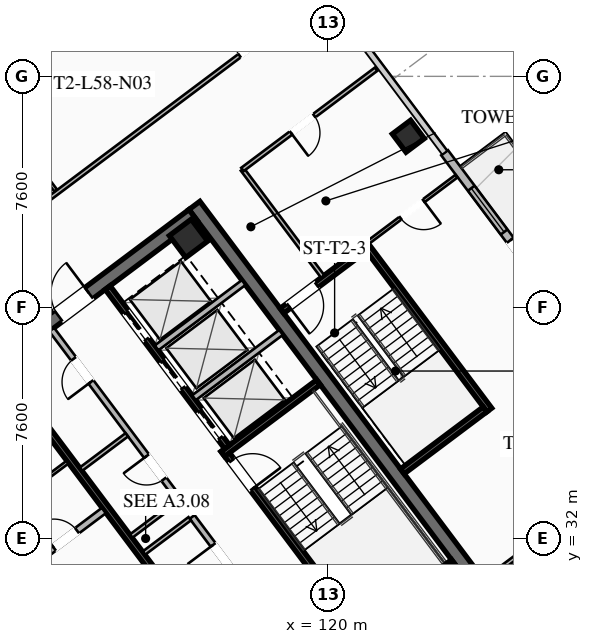
"""IFC4 building model, lengths in metres.
Left out: names, types, materials, properties, quantities, classifications, styles, units other than length and angle.
Written with IfcOpenShell. Run it as: python <this file> out.ifc"""

import sys

from ifc_helpers import new_model, si_unit, direction, frame, frame_2d, origin, origin_2d, place, context, subcontext, project, spatial, rectangle, hollow_rectangle, extrude, element, fill, save


model = new_model("IFC4")
c1 = context("Model", 3, precision=1e-05, world=origin(), true_north=direction((0.0, 1.0)))
c2 = subcontext(c1, "Body", "Model", "MODEL_VIEW")
j1 = project(units=[si_unit("LENGTHUNIT", "METRE"), si_unit("PLANEANGLEUNIT", "RADIAN")], contexts=[c1])
p1 = place(None, origin())
s1 = spatial("IfcSite", under=j1, at=p1, CompositionType="ELEMENT")
p2 = place(p1, origin())
s2 = spatial("IfcBuilding", under=s1, at=p2, CompositionType="ELEMENT")
p3 = place(p2, frame((0.0, 0.0, 214.85)))
s3 = spatial("IfcBuildingStorey", under=s2, at=p3, CompositionType="ELEMENT", Elevation=214.85)
for number, where, z_axis, x_axis in (
    (1, (112.396, 21.047, 0.0), (0.0, 0.0, 1.0), (-0.6, 0.8, 0.0)),
    (2, (115.604, 42.953, 0.0), (0.0, 0.0, 1.0), (0.6, -0.8, 0.0)),
):
    element("IfcWall", number, at=place(p3, frame(where, z_axis=z_axis, x_axis=x_axis)), inside=s3, PredefinedType="SHEAR", context=c2, shape_type="SweptSolid", body=[
        extrude(rectangle(XDim=15.6, YDim=0.45, at=frame_2d((7.8, 0.0))), origin(), (0.0, 0.0, 1.0), 3.55),
    ])
p4 = place(p3, frame((103.351, 33.482, 0.0), z_axis=(0.0, 0.0, 1.0), x_axis=(0.8, 0.6, 0.0)))
e3 = element("IfcWall", 3, at=p4, inside=s3, PredefinedType="SHEAR", context=c2, shape_type="SweptSolid", body=[
    extrude(rectangle(XDim=15.26, YDim=0.45, at=frame_2d((7.63, 0.0))), origin(), (0.0, 0.0, 1.0), 3.55),
])
p5 = place(p4, frame((4.68, 0.0, 0.0)))
e4 = element("IfcOpeningElement", 4, at=p5, cuts=e3, PredefinedType="OPENING", context=c2, shape_type="SweptSolid", body=[
    extrude(rectangle(XDim=1.25, YDim=2.25, at=frame_2d((0.625, 1.125))), frame((0.0, 0.235, 0.0), z_axis=(0.0, -1.0, 0.0), x_axis=(1.0, 0.0, 0.0)), (0.0, 0.0, 1.0), 0.47),
])
p6 = place(p4, frame((9.73, 0.0, 0.0)))
e5 = element("IfcOpeningElement", 5, at=p6, cuts=e3, PredefinedType="OPENING", context=c2, shape_type="SweptSolid", body=[
    extrude(rectangle(XDim=1.25, YDim=2.25, at=frame_2d((0.625, 1.125))), frame((0.0, 0.235, 0.0), z_axis=(0.0, -1.0, 0.0), x_axis=(1.0, 0.0, 0.0)), (0.0, 0.0, 1.0), 0.47),
])
for number, where, z_axis, x_axis in (
    (6, (123.87, 30.59, 0.0), (0.0, 0.0, 1.0), (0.8, 0.6, 0.0)),
    (7, (115.41, 41.87, 0.0), (0.0, 0.0, 1.0), (0.8, 0.6, 0.0)),
):
    element("IfcColumn", number, at=place(p3, frame(where, z_axis=z_axis, x_axis=x_axis)), inside=s3, PredefinedType="COLUMN", context=c2, shape_type="SweptSolid", body=[
        extrude(hollow_rectangle(XDim=0.9, YDim=0.9, WallThickness=0.04, at=origin_2d()), origin(), (0.0, 0.0, 1.0), 3.37),
    ])
p7 = place(p3, frame((122.64, 45.23, 0.0), z_axis=(0.0, 0.0, 1.0), x_axis=(0.799999996291, 0.600000004945, 0.0)))
e8 = element("IfcColumn", 8, at=p7, inside=s3, PredefinedType="COLUMN", context=c2, shape_type="SweptSolid", body=[
    extrude(hollow_rectangle(XDim=0.75, YDim=0.75, WallThickness=0.032, at=origin_2d()), origin(), (0.0, 0.0, 1.0), 3.37),
])
p8 = place(p3, frame((123.834, 44.688, 0.0), z_axis=(0.0, 0.0, 1.0), x_axis=(0.600004595526, -0.799996553335, 0.0)))
e9 = element("IfcWall", 9, at=p8, inside=s3, PredefinedType="SOLIDWALL", context=c2, shape_type="SweptSolid", body=[
    extrude(rectangle(XDim=8.5, YDim=0.28, at=frame_2d((4.25, 0.0))), origin(), (0.0, 0.0, 1.0), 3.37),
])
p9 = place(p8, frame((3.6, 0.0, 0.0)))
e10 = element("IfcOpeningElement", 10, at=p9, cuts=e9, PredefinedType="OPENING", context=c2, shape_type="SweptSolid", body=[
    extrude(rectangle(XDim=1.3, YDim=2.15, at=frame_2d((0.65, 1.075))), frame((0.0, 0.15, 0.0), z_axis=(0.0, -1.0, 0.0), x_axis=(1.0, 0.0, 0.0)), (0.0, 0.0, 1.0), 0.3),
])
p10 = place(p8, frame((1.46, 0.0, 0.85)))
e11 = element("IfcOpeningElement", 11, at=p10, cuts=e9, PredefinedType="OPENING", context=c2, shape_type="SweptSolid", body=[
    extrude(rectangle(XDim=1.8, YDim=1.92, at=frame_2d((0.9, 0.96))), frame((0.0, 0.15, 0.0), z_axis=(0.0, -1.0, 0.0), x_axis=(1.0, 0.0, 0.0)), (0.0, 0.0, 1.0), 0.3),
])
p11 = place(p3, frame((111.44, 29.08, 0.0), z_axis=(0.0, 0.0, 1.0), x_axis=(-0.59999041401, 0.800007189403, 0.0)))
e12 = element("IfcWall", 12, at=p11, inside=s3, PredefinedType="SHEAR", context=c2, shape_type="SweptSolid", body=[
    extrude(rectangle(XDim=8.15, YDim=0.2, at=frame_2d((4.075, 0.0))), origin(), (0.0, 0.0, 1.0), 3.37),
])
p12 = place(p11, frame((0.45, 0.0, 0.0)))
e13 = element("IfcOpeningElement", 13, at=p12, cuts=e12, PredefinedType="OPENING", context=c2, shape_type="SweptSolid", body=[
    extrude(rectangle(XDim=1.15, YDim=2.2, at=frame_2d((0.575, 1.1))), frame((0.0, 0.11, 0.0), z_axis=(0.0, -1.0, 0.0), x_axis=(1.0, 0.0, 0.0)), (0.0, 0.0, 1.0), 0.22),
])
p13 = place(p3, frame((116.56, 34.92, 0.0), z_axis=(0.0, 0.0, 1.0), x_axis=(0.59999041401, -0.800007189403, 0.0)))
e14 = element("IfcWall", 14, at=p13, inside=s3, PredefinedType="SHEAR", context=c2, shape_type="SweptSolid", body=[
    extrude(rectangle(XDim=8.15, YDim=0.2, at=frame_2d((4.075, 0.0))), origin(), (0.0, 0.0, 1.0), 3.37),
])
p14 = place(p13, frame((0.45, 0.0, 0.0)))
e15 = element("IfcOpeningElement", 15, at=p14, cuts=e14, PredefinedType="OPENING", context=c2, shape_type="SweptSolid", body=[
    extrude(rectangle(XDim=1.15, YDim=2.2, at=frame_2d((0.575, 1.1))), frame((0.0, 0.11, 0.0), z_axis=(0.0, -1.0, 0.0), x_axis=(1.0, 0.0, 0.0)), (0.0, 0.0, 1.0), 0.22),
])
for number, where, z_axis, x_axis in (
    (16, (116.54, 34.78, 0.0), (0.0, 0.0, 1.0), (0.8, 0.6, 0.0)),
    (17, (120.98, 28.86, 0.0), (0.0, 0.0, 1.0), (0.8, 0.6, 0.0)),
):
    element("IfcWall", number, at=place(p3, frame(where, z_axis=z_axis, x_axis=x_axis)), inside=s3, PredefinedType="SHEAR", context=c2, shape_type="SweptSolid", body=[
        extrude(rectangle(XDim=3.93, YDim=0.2, at=frame_2d((1.965, 0.0))), origin(), (0.0, 0.0, 1.0), 3.37),
    ])
p15 = place(p3, frame((118.058, 25.856, 0.0), z_axis=(0.0, 0.0, 1.0), x_axis=(-0.600002657301, 0.799998007018, 0.0)))
e18 = element("IfcWall", 18, at=p15, inside=s3, PredefinedType="SHEAR", context=c2, shape_type="SweptSolid", body=[
    extrude(rectangle(XDim=14.7, YDim=0.2, at=frame_2d((7.35, 0.0))), origin(), (0.0, 0.0, 1.0), 3.37),
])
p16 = place(p3, frame((110.104, 31.028, 0.0), z_axis=(0.0, 0.0, 1.0), x_axis=(0.800018601094, 0.59997519774, 0.0)))
e19 = element("IfcWall", 19, at=p16, inside=s3, PredefinedType="SOLIDWALL", context=c2, shape_type="SweptSolid", body=[
    extrude(rectangle(XDim=3.15, YDim=0.22, at=frame_2d((1.575, 0.0))), origin(), (0.0, 0.0, 1.0), 2.723),
])
p17 = place(p16, frame((1.1, 0.0, 0.0)))
e20 = element("IfcOpeningElement", 20, at=p17, cuts=e19, PredefinedType="OPENING", context=c2, shape_type="SweptSolid", body=[
    extrude(rectangle(XDim=0.95, YDim=2.05, at=frame_2d((0.475, 1.025))), frame((0.0, 0.12, 0.0), z_axis=(0.0, -1.0, 0.0), x_axis=(1.0, 0.0, 0.0)), (0.0, 0.0, 1.0), 0.24),
])
p18 = place(p3, frame((112.75, 40.25, 0.0), z_axis=(0.0, 0.0, 1.0), x_axis=(0.599994036198, -0.800004472816, 0.0)))
e21 = element("IfcWall", 21, at=p18, inside=s3, PredefinedType="SHEAR", context=c2, shape_type="SweptSolid", body=[
    extrude(rectangle(XDim=6.55, YDim=0.2, at=frame_2d((3.275, 0.0))), origin(), (0.0, 0.0, 1.0), 3.37),
])
p19 = place(p18, frame((5.075, 0.0, 0.0)))
e22 = element("IfcOpeningElement", 22, at=p19, cuts=e21, PredefinedType="OPENING", context=c2, shape_type="SweptSolid", body=[
    extrude(rectangle(XDim=1.1, YDim=2.2, at=frame_2d((0.55, 1.1))), frame((0.0, 0.11, 0.0), z_axis=(0.0, -1.0, 0.0), x_axis=(1.0, 0.0, 0.0)), (0.0, 0.0, 1.0), 0.22),
])
p20 = place(p18, frame((3.025, 0.0, 0.0)))
e23 = element("IfcOpeningElement", 23, at=p20, cuts=e21, PredefinedType="OPENING", context=c2, shape_type="SweptSolid", body=[
    extrude(rectangle(XDim=1.1, YDim=2.2, at=frame_2d((0.55, 1.1))), frame((0.0, 0.11, 0.0), z_axis=(0.0, -1.0, 0.0), x_axis=(1.0, 0.0, 0.0)), (0.0, 0.0, 1.0), 0.22),
])
p21 = place(p18, frame((1.025, 0.0, 0.0)))
e24 = element("IfcOpeningElement", 24, at=p21, cuts=e21, PredefinedType="OPENING", context=c2, shape_type="SweptSolid", body=[
    extrude(rectangle(XDim=1.1, YDim=2.2, at=frame_2d((0.55, 1.1))), frame((0.0, 0.11, 0.0), z_axis=(0.0, -1.0, 0.0), x_axis=(1.0, 0.0, 0.0)), (0.0, 0.0, 1.0), 0.22),
])
for number, where, z_axis, x_axis in (
    (25, (115.59, 36.63, 0.0), (0.0, 0.0, 1.0), (0.8, 0.6, 0.0)),
    (26, (114.36, 38.27, 0.0), (0.0, 0.0, 1.0), (0.8, 0.6, 0.0)),
):
    element("IfcWall", number, at=place(p3, frame(where, z_axis=z_axis, x_axis=x_axis)), inside=s3, PredefinedType="SOLIDWALL", context=c2, shape_type="SweptSolid", body=[
        extrude(rectangle(XDim=3.58, YDim=0.2, at=frame_2d((1.79, 0.0))), origin(), (0.0, 0.0, 1.0), 3.37),
    ])
p22 = place(p3, frame((108.91, 32.62, 0.0), z_axis=(0.0, 0.0, 1.0), x_axis=(0.800018601094, 0.59997519774, 0.0)))
e27 = element("IfcWall", 27, at=p22, inside=s3, PredefinedType="PARTITIONING", context=c2, shape_type="SweptSolid", body=[
    extrude(rectangle(XDim=3.15, YDim=0.11, at=frame_2d((1.575, 0.0))), origin(), (0.0, 0.0, 1.0), 2.723),
])
p23 = place(p3, frame((119.73, 27.11, 0.0), z_axis=(0.0, 0.0, 1.0), x_axis=(-0.600005580459, 0.799995814625, 0.0)))
e28 = element("IfcWall", 28, at=p23, inside=s3, PredefinedType="SOLIDWALL", context=c2, shape_type="SweptSolid", body=[
    extrude(rectangle(XDim=7.0, YDim=0.2, at=frame_2d((3.5, 0.0))), origin(), (0.0, 0.0, 1.0), 2.723),
])
p24 = place(p23, frame((0.85, 0.0, 0.0)))
e29 = element("IfcOpeningElement", 29, at=p24, cuts=e28, PredefinedType="OPENING", context=c2, shape_type="SweptSolid", body=[
    extrude(rectangle(XDim=0.95, YDim=2.05, at=frame_2d((0.475, 1.025))), frame((0.0, 0.11, 0.0), z_axis=(0.0, -1.0, 0.0), x_axis=(1.0, 0.0, 0.0)), (0.0, 0.0, 1.0), 0.22),
])
p25 = place(p23, frame((4.8, 0.0, 0.0)))
e30 = element("IfcOpeningElement", 30, at=p25, cuts=e28, PredefinedType="OPENING", context=c2, shape_type="SweptSolid", body=[
    extrude(rectangle(XDim=1.05, YDim=2.2, at=frame_2d((0.525, 1.1))), frame((0.0, 0.11, 0.0), z_axis=(0.0, -1.0, 0.0), x_axis=(1.0, 0.0, 0.0)), (0.0, 0.0, 1.0), 0.22),
])
p26 = place(p3, frame((113.946, 31.522, 0.0), z_axis=(0.0, 0.0, 1.0), x_axis=(0.8, 0.6, 0.0)))
e31 = element("IfcWall", 31, at=p26, inside=s3, PredefinedType="PARTITIONING", context=c2, shape_type="SweptSolid", body=[
    extrude(rectangle(XDim=1.88, YDim=0.135, at=frame_2d((0.94, 0.0))), origin(), (0.0, 0.0, 1.0), 2.723),
])
p27 = place(p3, frame((115.11, 33.27, 0.0), z_axis=(0.0, 0.0, 1.0), x_axis=(-0.600011160345, 0.79999162962, 0.0)))
e32 = element("IfcWall", 32, at=p27, inside=s3, PredefinedType="SOLIDWALL", context=c2, shape_type="SweptSolid", body=[
    extrude(rectangle(XDim=7.0, YDim=0.2, at=frame_2d((3.5, 0.0))), origin(), (0.0, 0.0, 1.0), 2.723),
])
p28 = place(p27, frame((0.85, 0.0, 0.0)))
e33 = element("IfcOpeningElement", 33, at=p28, cuts=e32, PredefinedType="OPENING", context=c2, shape_type="SweptSolid", body=[
    extrude(rectangle(XDim=0.95, YDim=2.05, at=frame_2d((0.475, 1.025))), frame((0.0, 0.11, 0.0), z_axis=(0.0, -1.0, 0.0), x_axis=(1.0, 0.0, 0.0)), (0.0, 0.0, 1.0), 0.22),
])
p29 = place(p27, frame((4.85, 0.0, 0.0)))
e34 = element("IfcOpeningElement", 34, at=p29, cuts=e32, PredefinedType="OPENING", context=c2, shape_type="SweptSolid", body=[
    extrude(rectangle(XDim=0.95, YDim=2.05, at=frame_2d((0.475, 1.025))), frame((0.0, 0.11, 0.0), z_axis=(0.0, -1.0, 0.0), x_axis=(1.0, 0.0, 0.0)), (0.0, 0.0, 1.0), 0.22),
])
p30 = place(p3, frame((113.526, 32.082, 0.0), z_axis=(0.0, 0.0, 1.0), x_axis=(0.800046745961, 0.599937666993, 0.0)))
e35 = element("IfcWall", 35, at=p30, inside=s3, PredefinedType="PARTITIONING", context=c2, shape_type="SweptSolid", body=[
    extrude(rectangle(XDim=1.88, YDim=0.135, at=frame_2d((0.94, 0.0))), origin(), (0.0, 0.0, 1.0), 2.723),
])
p31 = place(p3, frame((111.876, 34.282, 0.0), z_axis=(0.0, 0.0, 1.0), x_axis=(0.8, 0.6, 0.0)))
e36 = element("IfcWall", 36, at=p31, inside=s3, PredefinedType="PARTITIONING", context=c2, shape_type="SweptSolid", body=[
    extrude(rectangle(XDim=1.88, YDim=0.135, at=frame_2d((0.94, 0.0))), origin(), (0.0, 0.0, 1.0), 2.723),
])
p32 = place(p3, frame((125.304, 36.228, 0.0), z_axis=(0.0, 0.0, 1.0), x_axis=(-0.59998851072, 0.800008616831, 0.0)))
e37 = element("IfcWall", 37, at=p32, inside=s3, PredefinedType="SHEAR", context=c2, shape_type="SweptSolid", body=[
    extrude(rectangle(XDim=6.8, YDim=0.2, at=frame_2d((3.4, 0.0))), origin(), (0.0, 0.0, 1.0), 3.37),
])
p33 = place(p3, frame((121.204, 41.528, 0.0), z_axis=(0.0, 0.0, 1.0), x_axis=(-0.800017232136, -0.599977023131, 0.0)))
e38 = element("IfcWall", 38, at=p33, inside=s3, PredefinedType="SHEAR", context=c2, shape_type="SweptSolid", body=[
    extrude(rectangle(XDim=3.4, YDim=0.2, at=frame_2d((1.7, 0.0))), origin(), (0.0, 0.0, 1.0), 3.37),
])
p34 = place(p33, frame((1.975, 0.0, 0.0)))
e39 = element("IfcOpeningElement", 39, at=p34, cuts=e38, PredefinedType="OPENING", context=c2, shape_type="SweptSolid", body=[
    extrude(rectangle(XDim=1.15, YDim=2.2, at=frame_2d((0.575, 1.1))), frame((0.0, 0.11, 0.0), z_axis=(0.0, -1.0, 0.0), x_axis=(1.0, 0.0, 0.0)), (0.0, 0.0, 1.0), 0.22),
])
p35 = place(p3, frame((122.444, 34.208, 0.0), z_axis=(0.0, 0.0, 1.0), x_axis=(0.79999138319, 0.600011488909, 0.0)))
e40 = element("IfcWall", 40, at=p35, inside=s3, PredefinedType="SHEAR", context=c2, shape_type="SweptSolid", body=[
    extrude(rectangle(XDim=3.4, YDim=0.2, at=frame_2d((1.7, 0.0))), origin(), (0.0, 0.0, 1.0), 3.37),
])
p36 = place(p3, frame((119.824, 40.618, 0.0), z_axis=(0.0, 0.0, 1.0), x_axis=(-0.599982243973, 0.800013316712, 0.0)))
e41 = element("IfcWall", 41, at=p36, inside=s3, PredefinedType="PARTITIONING", context=c2, shape_type="SweptSolid", body=[
    extrude(rectangle(XDim=4.4, YDim=0.135, at=frame_2d((2.2, 0.0))), origin(), (0.0, 0.0, 1.0), 2.723),
])
p37 = place(p3, frame((98.666, 34.062, 0.0), z_axis=(0.0, 0.0, 1.0), x_axis=(0.800003619866, 0.599995173482, 0.0)))
e42 = element("IfcWall", 42, at=p37, inside=s3, PredefinedType="PARTITIONING", context=c2, shape_type="SweptSolid", body=[
    extrude(rectangle(XDim=24.28, YDim=0.135, at=frame_2d((12.14, 0.0))), origin(), (0.0, 0.0, 1.0), 2.723),
])
p38 = place(p37, frame((0.3, 0.0, 0.0)))
e43 = element("IfcOpeningElement", 43, at=p38, cuts=e42, PredefinedType="OPENING", context=c2, shape_type="SweptSolid", body=[
    extrude(rectangle(XDim=0.95, YDim=2.05, at=frame_2d((0.475, 1.025))), frame((0.0, 0.077, 0.0), z_axis=(0.0, -1.0, 0.0), x_axis=(1.0, 0.0, 0.0)), (0.0, 0.0, 1.0), 0.155),
])
p39 = place(p37, frame((10.854, 0.0, 0.0)))
e44 = element("IfcOpeningElement", 44, at=p39, cuts=e42, PredefinedType="OPENING", context=c2, shape_type="SweptSolid", body=[
    extrude(rectangle(XDim=0.95, YDim=2.05, at=frame_2d((0.475, 1.025))), frame((0.0, 0.077, 0.0), z_axis=(0.0, -1.0, 0.0), x_axis=(1.0, 0.0, 0.0)), (0.0, 0.0, 1.0), 0.155),
])
p40 = place(p37, frame((23.03, 0.0, 0.0)))
e45 = element("IfcOpeningElement", 45, at=p40, cuts=e42, PredefinedType="OPENING", context=c2, shape_type="SweptSolid", body=[
    extrude(rectangle(XDim=0.95, YDim=2.05, at=frame_2d((0.475, 1.025))), frame((0.0, 0.077, 0.0), z_axis=(0.0, -1.0, 0.0), x_axis=(1.0, 0.0, 0.0)), (0.0, 0.0, 1.0), 0.155),
])
p41 = place(p3, frame((111.042, 43.444, 0.0), z_axis=(0.0, 0.0, 1.0), x_axis=(-0.600008585315, 0.799993560942, 0.0)))
e46 = element("IfcWall", 46, at=p41, inside=s3, PredefinedType="PARTITIONING", context=c2, shape_type="SweptSolid", body=[
    extrude(rectangle(XDim=4.55, YDim=0.11, at=frame_2d((2.275, 0.0))), origin(), (0.0, 0.0, 1.0), 2.723),
])
p42 = place(p3, frame((121.584, 47.438, 0.0), z_axis=(0.0, 0.0, 1.0), x_axis=(-0.79998934637, -0.600014204577, 0.0)))
e47 = element("IfcWall", 47, at=p42, inside=s3, PredefinedType="PARTITIONING", context=c2, shape_type="SweptSolid", body=[
    extrude(rectangle(XDim=5.5, YDim=0.135, at=frame_2d((2.75, 0.0))), origin(), (0.0, 0.0, 1.0), 2.723),
])
p43 = place(p42, frame((2.55, 0.0, 0.0)))
e48 = element("IfcOpeningElement", 48, at=p43, cuts=e47, PredefinedType="OPENING", context=c2, shape_type="SweptSolid", body=[
    extrude(rectangle(XDim=0.95, YDim=2.05, at=frame_2d((0.475, 1.025))), frame((0.0, 0.077, 0.0), z_axis=(0.0, -1.0, 0.0), x_axis=(1.0, 0.0, 0.0)), (0.0, 0.0, 1.0), 0.155),
])
p44 = place(p3, frame((125.208, 30.656, 0.0), z_axis=(0.0, 0.0, 1.0), x_axis=(0.800004085978, 0.599994551991, 0.0)))
e49 = element("IfcWall", 49, at=p44, inside=s3, PredefinedType="PARTITIONING", context=c2, shape_type="SweptSolid", body=[
    extrude(rectangle(XDim=7.17, YDim=0.135, at=frame_2d((3.585, 0.0))), origin(), (0.0, 0.0, 1.0), 2.723),
])
p45 = place(p3, frame((124.224, 43.918, 0.0), z_axis=(0.0, 0.0, 1.0), x_axis=(-0.800024078335, -0.599967894211, 0.0)))
e50 = element("IfcWall", 50, at=p45, inside=s3, PredefinedType="PARTITIONING", context=c2, shape_type="SweptSolid", body=[
    extrude(rectangle(XDim=3.65, YDim=0.11, at=frame_2d((1.825, 0.0))), origin(), (0.0, 0.0, 1.0), 2.723),
])
p46 = place(p45, frame((1.35, 0.0, 0.0)))
e51 = element("IfcOpeningElement", 51, at=p46, cuts=e50, PredefinedType="OPENING", context=c2, shape_type="SweptSolid", body=[
    extrude(rectangle(XDim=0.95, YDim=2.05, at=frame_2d((0.475, 1.025))), frame((0.0, 0.065, 0.0), z_axis=(0.0, -1.0, 0.0), x_axis=(1.0, 0.0, 0.0)), (0.0, 0.0, 1.0), 0.13),
])
p47 = place(p3, frame((110.87, 17.79, 0.0), z_axis=(0.0, 0.0, 1.0), x_axis=(-0.6, 0.8, 0.0)))
e52 = element("IfcWall", 52, at=p47, inside=s3, PredefinedType="PARTITIONING", context=c2, shape_type="SweptSolid", body=[
    extrude(rectangle(XDim=20.26, YDim=0.135, at=frame_2d((10.13, 0.0))), origin(), (0.0, 0.0, 1.0), 2.723),
])
p48 = place(p47, frame((19.01, 0.0, 0.0)))
e53 = element("IfcOpeningElement", 53, at=p48, cuts=e52, PredefinedType="OPENING", context=c2, shape_type="SweptSolid", body=[
    extrude(rectangle(XDim=0.95, YDim=2.05, at=frame_2d((0.475, 1.025))), frame((0.0, 0.077, 0.0), z_axis=(0.0, -1.0, 0.0), x_axis=(1.0, 0.0, 0.0)), (0.0, 0.0, 1.0), 0.155),
])
p49 = place(p9, origin())
e54 = element("IfcDoor", 54, at=p49, inside=s3, OperationType="SINGLE_SWING_LEFT", PredefinedType="DOOR", context=c2, shape_type="SweptSolid", body=[
    extrude(rectangle(XDim=1.3, YDim=2.15, at=frame_2d((0.65, 1.075))), frame((0.0, 0.025, 0.0), z_axis=(0.0, -1.0, 0.0), x_axis=(1.0, 0.0, 0.0)), (0.0, 0.0, 1.0), 0.05),
])
fill(e10, e54)
p50 = place(p10, origin())
e55 = element("IfcWindow", 55, at=p50, inside=s3, PartitioningType="SINGLE_PANEL", PredefinedType="WINDOW", context=c2, shape_type="SweptSolid", body=[
    extrude(rectangle(XDim=1.8, YDim=1.92, at=frame_2d((0.9, 0.96))), frame((0.0, 0.03, 0.0), z_axis=(0.0, -1.0, 0.0), x_axis=(1.0, 0.0, 0.0)), (0.0, 0.0, 1.0), 0.06),
])
fill(e11, e55)
p51 = place(p6, origin())
e56 = element("IfcDoor", 56, at=p51, inside=s3, OperationType="SINGLE_SWING_RIGHT", PredefinedType="DOOR", context=c2, shape_type="SweptSolid", body=[
    extrude(rectangle(XDim=1.25, YDim=2.25, at=frame_2d((0.625, 1.125))), frame((0.0, 0.025, 0.0), z_axis=(0.0, -1.0, 0.0), x_axis=(1.0, 0.0, 0.0)), (0.0, 0.0, 1.0), 0.05),
])
fill(e5, e56)
p52 = place(p14, origin())
e57 = element("IfcDoor", 57, at=p52, inside=s3, OperationType="SINGLE_SWING_RIGHT", PredefinedType="DOOR", context=c2, shape_type="SweptSolid", body=[
    extrude(rectangle(XDim=1.15, YDim=2.2, at=frame_2d((0.575, 1.1))), frame((0.0, 0.025, 0.0), z_axis=(0.0, -1.0, 0.0), x_axis=(1.0, 0.0, 0.0)), (0.0, 0.0, 1.0), 0.05),
])
fill(e15, e57)
p53 = place(p17, origin())
e58 = element("IfcDoor", 58, at=p53, inside=s3, OperationType="SINGLE_SWING_LEFT", PredefinedType="DOOR", context=c2, shape_type="SweptSolid", body=[
    extrude(rectangle(XDim=0.95, YDim=2.05, at=frame_2d((0.475, 1.025))), frame((0.0, 0.025, 0.0), z_axis=(0.0, -1.0, 0.0), x_axis=(1.0, 0.0, 0.0)), (0.0, 0.0, 1.0), 0.05),
])
fill(e20, e58)
p54 = place(p25, origin())
e59 = element("IfcDoor", 59, at=p54, inside=s3, OperationType="SINGLE_SWING_RIGHT", PredefinedType="DOOR", context=c2, shape_type="SweptSolid", body=[
    extrude(rectangle(XDim=1.05, YDim=2.2, at=frame_2d((0.525, 1.1))), frame((0.0, 0.025, 0.0), z_axis=(0.0, -1.0, 0.0), x_axis=(1.0, 0.0, 0.0)), (0.0, 0.0, 1.0), 0.05),
])
fill(e30, e59)
p55 = place(p28, origin())
e60 = element("IfcDoor", 60, at=p55, inside=s3, OperationType="SINGLE_SWING_RIGHT", PredefinedType="DOOR", context=c2, shape_type="SweptSolid", body=[
    extrude(rectangle(XDim=0.95, YDim=2.05, at=frame_2d((0.475, 1.025))), frame((0.0, 0.025, 0.0), z_axis=(0.0, -1.0, 0.0), x_axis=(1.0, 0.0, 0.0)), (0.0, 0.0, 1.0), 0.05),
])
fill(e33, e60)
p56 = place(p29, origin())
e61 = element("IfcDoor", 61, at=p56, inside=s3, OperationType="SINGLE_SWING_LEFT", PredefinedType="DOOR", context=c2, shape_type="SweptSolid", body=[
    extrude(rectangle(XDim=0.95, YDim=2.05, at=frame_2d((0.475, 1.025))), frame((0.0, 0.025, 0.0), z_axis=(0.0, -1.0, 0.0), x_axis=(1.0, 0.0, 0.0)), (0.0, 0.0, 1.0), 0.05),
])
fill(e34, e61)
p57 = place(p34, origin())
e62 = element("IfcDoor", 62, at=p57, inside=s3, OperationType="SINGLE_SWING_RIGHT", PredefinedType="DOOR", context=c2, shape_type="SweptSolid", body=[
    extrude(rectangle(XDim=1.15, YDim=2.2, at=frame_2d((0.575, 1.1))), frame((0.0, 0.025, 0.0), z_axis=(0.0, -1.0, 0.0), x_axis=(1.0, 0.0, 0.0)), (0.0, 0.0, 1.0), 0.05),
])
fill(e39, e62)
p58 = place(p40, origin())
e63 = element("IfcDoor", 63, at=p58, inside=s3, OperationType="SINGLE_SWING_RIGHT", PredefinedType="DOOR", context=c2, shape_type="SweptSolid", body=[
    extrude(rectangle(XDim=0.95, YDim=2.05, at=frame_2d((0.475, 1.025))), frame((0.0, 0.025, 0.0), z_axis=(0.0, -1.0, 0.0), x_axis=(1.0, 0.0, 0.0)), (0.0, 0.0, 1.0), 0.05),
])
fill(e45, e63)
p59 = place(p43, origin())
e64 = element("IfcDoor", 64, at=p59, inside=s3, OperationType="SINGLE_SWING_RIGHT", PredefinedType="DOOR", context=c2, shape_type="SweptSolid", body=[
    extrude(rectangle(XDim=0.95, YDim=2.05, at=frame_2d((0.475, 1.025))), frame((0.0, 0.025, 0.0), z_axis=(0.0, -1.0, 0.0), x_axis=(1.0, 0.0, 0.0)), (0.0, 0.0, 1.0), 0.05),
])
fill(e48, e64)
p60 = place(p46, origin())
e65 = element("IfcDoor", 65, at=p60, inside=s3, OperationType="SINGLE_SWING_LEFT", PredefinedType="DOOR", context=c2, shape_type="SweptSolid", body=[
    extrude(rectangle(XDim=0.95, YDim=2.05, at=frame_2d((0.475, 1.025))), frame((0.0, 0.025, 0.0), z_axis=(0.0, -1.0, 0.0), x_axis=(1.0, 0.0, 0.0)), (0.0, 0.0, 1.0), 0.05),
])
fill(e51, e65)
p61 = place(p19, origin())
e66 = element("IfcDoor", 66, at=p61, inside=s3, OperationType="SLIDING_TO_LEFT", PredefinedType="DOOR", context=c2, shape_type="SweptSolid", body=[
    extrude(rectangle(XDim=1.1, YDim=2.2, at=frame_2d((0.55, 1.1))), frame((0.0, 0.025, 0.0), z_axis=(0.0, -1.0, 0.0), x_axis=(1.0, 0.0, 0.0)), (0.0, 0.0, 1.0), 0.05),
])
fill(e22, e66)
p62 = place(p20, origin())
e67 = element("IfcDoor", 67, at=p62, inside=s3, OperationType="SLIDING_TO_LEFT", PredefinedType="DOOR", context=c2, shape_type="SweptSolid", body=[
    extrude(rectangle(XDim=1.1, YDim=2.2, at=frame_2d((0.55, 1.1))), frame((0.0, 0.025, 0.0), z_axis=(0.0, -1.0, 0.0), x_axis=(1.0, 0.0, 0.0)), (0.0, 0.0, 1.0), 0.05),
])
fill(e23, e67)
p63 = place(p21, origin())
e68 = element("IfcDoor", 68, at=p63, inside=s3, OperationType="SLIDING_TO_LEFT", PredefinedType="DOOR", context=c2, shape_type="SweptSolid", body=[
    extrude(rectangle(XDim=1.1, YDim=2.2, at=frame_2d((0.55, 1.1))), frame((0.0, 0.025, 0.0), z_axis=(0.0, -1.0, 0.0), x_axis=(1.0, 0.0, 0.0)), (0.0, 0.0, 1.0), 0.05),
])
fill(e24, e68)
save(model, sys.argv[1])
